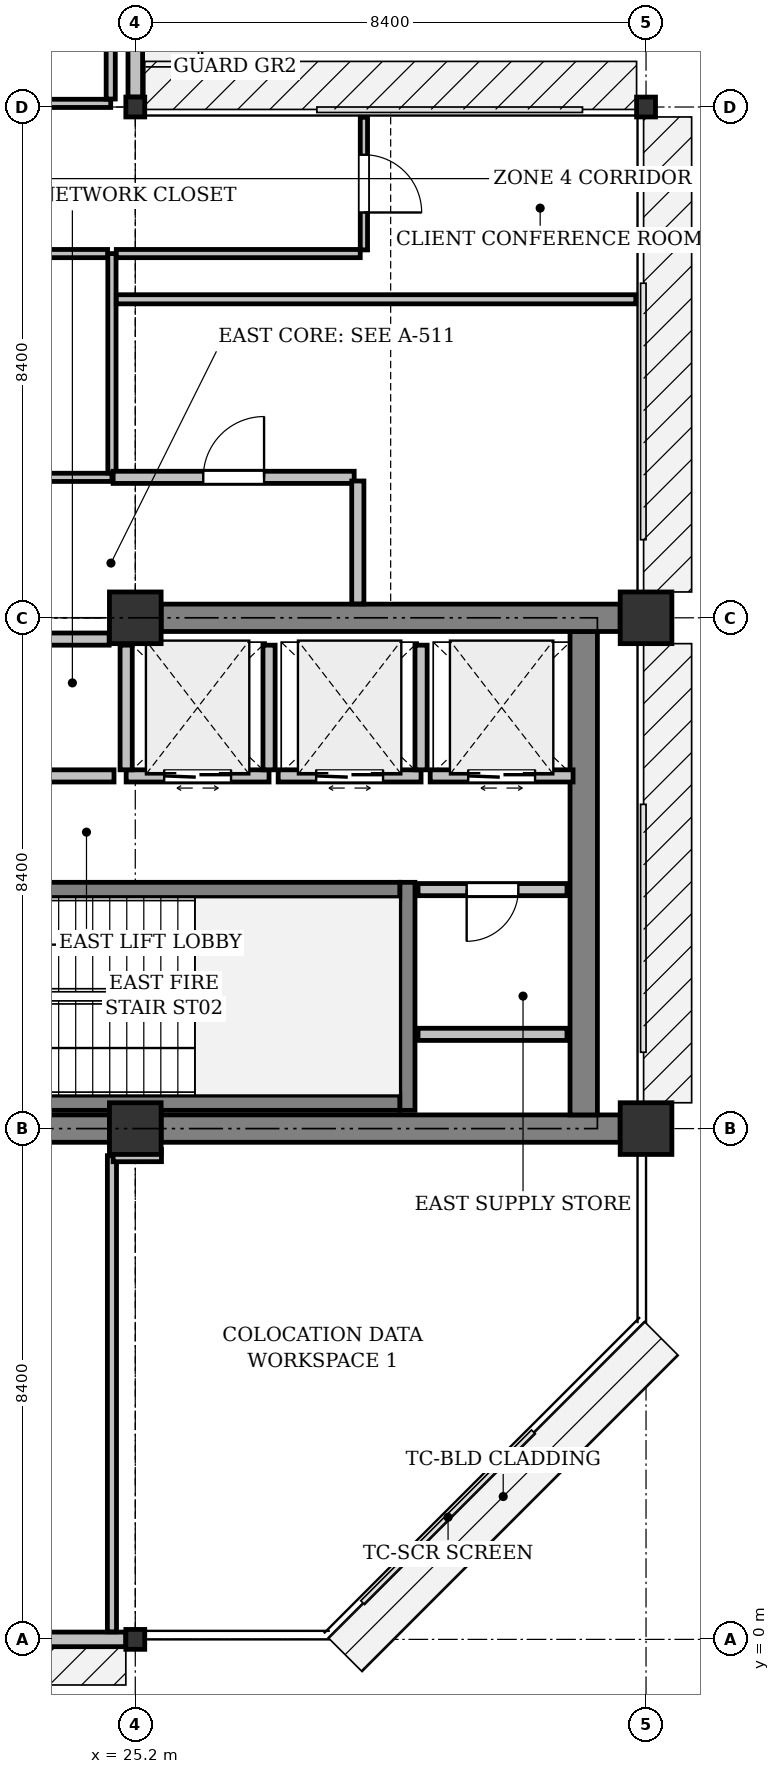
"""IFC4 building model, lengths in metres.
Left out: names, types, materials, properties, quantities, classifications, styles, units other than length and angle.
Written with IfcOpenShell. Run it as: python <this file> out.ifc"""

import sys

from ifc_helpers import new_model, si_unit, direction, frame, frame_2d, origin, origin_2d, place, context, subcontext, project, spatial, rectangle, i_section, extrude, element, fill, save


model = new_model("IFC4")
c1 = context("Model", 3, precision=1e-05, world=origin(), true_north=direction((0.0, 1.0)))
c2 = subcontext(c1, "Body", "Model", "MODEL_VIEW")
j1 = project(units=[si_unit("LENGTHUNIT", "METRE"), si_unit("PLANEANGLEUNIT", "RADIAN")], contexts=[c1])
p1 = place(None, origin())
s1 = spatial("IfcSite", under=j1, at=p1, CompositionType="ELEMENT")
p2 = place(p1, origin())
s2 = spatial("IfcBuilding", under=s1, at=p2, CompositionType="ELEMENT")
p3 = place(p2, frame((0.0, 0.0, 314.2)))
s3 = spatial("IfcBuildingStorey", under=s2, at=p3, CompositionType="ELEMENT", Elevation=314.2)
p4 = place(p3, frame((25.2, 0.0, 0.0), z_axis=(0.0, 0.0, 1.0), x_axis=(1.0, 0.0, 0.0)))
e1 = element("IfcColumn", 1, at=p4, inside=s3, PredefinedType="COLUMN", context=c2, shape_type="SweptSolid", body=[
    extrude(i_section(OverallWidth=0.311, OverallDepth=0.327, WebThickness=0.016, FlangeThickness=0.025, FilletRadius=0.017, at=origin_2d()), origin(), (0.0, 0.0, 1.0), 4.0),
])
for number, where, z_axis, x_axis in (
    (2, (25.2, 8.4, 0.0), (0.0, 0.0, 1.0), (1.0, 0.0, 0.0)),
    (3, (25.2, 16.8, 0.0), (0.0, 0.0, 1.0), (1.0, 0.0, 0.0)),
):
    element("IfcColumn", number, at=place(p3, frame(where, z_axis=z_axis, x_axis=x_axis)), inside=s3, PredefinedType="COLUMN", context=c2, shape_type="SweptSolid", body=[
        extrude(rectangle(XDim=0.85, YDim=0.85, at=origin_2d()), origin(), (0.0, 0.0, 1.0), 4.0),
    ])
p5 = place(p3, frame((25.2, 25.2, 0.0), z_axis=(0.0, 0.0, 1.0), x_axis=(1.0, 0.0, 0.0)))
e4 = element("IfcColumn", 4, at=p5, inside=s3, PredefinedType="COLUMN", context=c2, shape_type="SweptSolid", body=[
    extrude(i_section(OverallWidth=0.311, OverallDepth=0.327, WebThickness=0.016, FlangeThickness=0.025, FilletRadius=0.017, at=origin_2d()), origin(), (0.0, 0.0, 1.0), 4.0),
])
for number, where, z_axis, x_axis in (
    (5, (33.6, 8.4, 0.0), (0.0, 0.0, 1.0), (1.0, 0.0, 0.0)),
    (6, (33.6, 16.8, 0.0), (0.0, 0.0, 1.0), (1.0, 0.0, 0.0)),
):
    element("IfcColumn", number, at=place(p3, frame(where, z_axis=z_axis, x_axis=x_axis)), inside=s3, PredefinedType="COLUMN", context=c2, shape_type="SweptSolid", body=[
        extrude(rectangle(XDim=0.85, YDim=0.85, at=origin_2d()), origin(), (0.0, 0.0, 1.0), 4.0),
    ])
p6 = place(p3, frame((33.6, 25.2, 0.0), z_axis=(0.0, 0.0, 1.0), x_axis=(1.0, 0.0, 0.0)))
e7 = element("IfcColumn", 7, at=p6, inside=s3, PredefinedType="COLUMN", context=c2, shape_type="SweptSolid", body=[
    extrude(i_section(OverallWidth=0.311, OverallDepth=0.327, WebThickness=0.016, FlangeThickness=0.025, FilletRadius=0.017, at=origin_2d()), origin(), (0.0, 0.0, 1.0), 4.0),
])
p7 = place(p3, frame((25.044, 0.0, 0.0), z_axis=(0.0, 0.0, 1.0), x_axis=(-1.0, 0.0, 0.0)))
e8 = element("IfcWall", 8, at=p7, inside=s3, PredefinedType="STANDARD", context=c2, shape_type="SweptSolid", body=[
    extrude(rectangle(XDim=8.089, YDim=0.24, at=frame_2d((4.044, 0.0))), origin(), (0.0, 0.0, 1.0), 3.475),
])
p8 = place(p7, frame((3.364, 0.0, 0.9)))
e9 = element("IfcOpeningElement", 9, at=p8, cuts=e8, PredefinedType="OPENING", context=c2, shape_type="SweptSolid", body=[
    extrude(rectangle(XDim=1.5, YDim=1.6, at=frame_2d((0.75, 0.8))), frame((0.0, 0.13, 0.0), z_axis=(0.0, -1.0, 0.0), x_axis=(1.0, 0.0, 0.0)), (0.0, 0.0, 1.0), 0.26),
])
p9 = place(p3, frame((25.2, 33.437, 0.0), z_axis=(0.0, 0.0, 1.0), x_axis=(0.0, -1.0, 0.0)))
e10 = element("IfcWall", 10, at=p9, inside=s3, PredefinedType="STANDARD", context=c2, shape_type="SweptSolid", body=[
    extrude(rectangle(XDim=8.073, YDim=0.24, at=frame_2d((4.037, 0.0))), origin(), (0.0, 0.0, 1.0), 3.475),
])
p10 = place(p9, frame((0.3, 0.0, 0.0)))
e11 = element("IfcOpeningElement", 11, at=p10, cuts=e10, PredefinedType="OPENING", context=c2, shape_type="SweptSolid", body=[
    extrude(rectangle(XDim=1.2, YDim=2.2, at=frame_2d((0.6, 1.1))), frame((0.0, 0.13, 0.0), z_axis=(0.0, -1.0, 0.0), x_axis=(1.0, 0.0, 0.0)), (0.0, 0.0, 1.0), 0.26),
])
p11 = place(p9, frame((3.287, 0.0, 0.9)))
e12 = element("IfcOpeningElement", 12, at=p11, cuts=e10, PredefinedType="OPENING", context=c2, shape_type="SweptSolid", body=[
    extrude(rectangle(XDim=1.5, YDim=1.6, at=frame_2d((0.75, 0.8))), frame((0.0, 0.13, 0.0), z_axis=(0.0, -1.0, 0.0), x_axis=(1.0, 0.0, 0.0)), (0.0, 0.0, 1.0), 0.26),
])
p12 = place(p3, frame((17.225, 8.4, 0.0), z_axis=(0.0, 0.0, 1.0), x_axis=(1.0, 0.0, 0.0)))
e13 = element("IfcWall", 13, at=p12, inside=s3, PredefinedType="SHEAR", context=c2, shape_type="SweptSolid", body=[
    extrude(rectangle(XDim=7.55, YDim=0.45, at=frame_2d((3.775, 0.0))), origin(), (0.0, 0.0, 1.0), 3.725),
])
p13 = place(p3, frame((25.625, 8.4, 0.0), z_axis=(0.0, 0.0, 1.0), x_axis=(1.0, 0.0, 0.0)))
e14 = element("IfcWall", 14, at=p13, inside=s3, PredefinedType="SHEAR", context=c2, shape_type="SweptSolid", body=[
    extrude(rectangle(XDim=7.55, YDim=0.45, at=frame_2d((3.775, 0.0))), origin(), (0.0, 0.0, 1.0), 3.725),
])
p14 = place(p3, frame((32.575, 8.625, 0.0), z_axis=(0.0, 0.0, 1.0), x_axis=(0.0, 1.0, 0.0)))
e15 = element("IfcWall", 15, at=p14, inside=s3, PredefinedType="SHEAR", context=c2, shape_type="SweptSolid", body=[
    extrude(rectangle(XDim=7.95, YDim=0.45, at=frame_2d((3.975, 0.0))), origin(), (0.0, 0.0, 1.0), 3.725),
])
p15 = place(p3, frame((25.625, 16.8, 0.0), z_axis=(0.0, 0.0, 1.0), x_axis=(1.0, 0.0, 0.0)))
e16 = element("IfcWall", 16, at=p15, inside=s3, PredefinedType="SHEAR", context=c2, shape_type="SweptSolid", body=[
    extrude(rectangle(XDim=7.55, YDim=0.45, at=frame_2d((3.775, 0.0))), origin(), (0.0, 0.0, 1.0), 3.725),
])
p16 = place(p3, frame((29.675, 8.7, 0.0), z_axis=(0.0, 0.0, 1.0), x_axis=(0.0, 1.0, 0.0)))
e17 = element("IfcWall", 17, at=p16, inside=s3, PredefinedType="SHEAR", context=c2, shape_type="SweptSolid", body=[
    extrude(rectangle(XDim=3.75, YDim=0.25, at=frame_2d((1.875, 0.0))), origin(), (0.0, 0.0, 1.0), 3.725),
])
p17 = place(p3, frame((21.8, 8.825, 0.0), z_axis=(0.0, 0.0, 1.0), x_axis=(1.0, 0.0, 0.0)))
e18 = element("IfcWall", 18, at=p17, inside=s3, PredefinedType="SHEAR", context=c2, shape_type="SweptSolid", body=[
    extrude(rectangle(XDim=7.75, YDim=0.25, at=frame_2d((3.875, 0.0))), origin(), (0.0, 0.0, 1.0), 3.725),
])
p18 = place(p3, frame((21.8, 12.325, 0.0), z_axis=(0.0, 0.0, 1.0), x_axis=(1.0, 0.0, 0.0)))
e19 = element("IfcWall", 19, at=p18, inside=s3, PredefinedType="SHEAR", context=c2, shape_type="SweptSolid", body=[
    extrude(rectangle(XDim=7.75, YDim=0.25, at=frame_2d((3.875, 0.0))), origin(), (0.0, 0.0, 1.0), 3.725),
])
p19 = place(p18, frame((0.22, 0.0, 0.0)))
e20 = element("IfcOpeningElement", 20, at=p19, cuts=e19, PredefinedType="OPENING", context=c2, shape_type="SweptSolid", body=[
    extrude(rectangle(XDim=1.1, YDim=2.15, at=frame_2d((0.55, 1.075))), frame((0.0, 0.135, 0.0), z_axis=(0.0, -1.0, 0.0), x_axis=(1.0, 0.0, 0.0)), (0.0, 0.0, 1.0), 0.27),
])
p20 = place(p3, frame((25.05, 14.2, 0.0), z_axis=(0.0, 0.0, 1.0), x_axis=(1.0, 0.0, 0.0)))
e21 = element("IfcWall", 21, at=p20, inside=s3, PredefinedType="PARTITIONING", context=c2, shape_type="SweptSolid", body=[
    extrude(rectangle(XDim=2.35, YDim=0.2, at=frame_2d((1.175, 0.0))), origin(), (0.0, 0.0, 1.0), 3.725),
])
p21 = place(p20, frame((0.625, 0.0, 0.0)))
e22 = element("IfcOpeningElement", 22, at=p21, cuts=e21, PredefinedType="OPENING", context=c2, shape_type="SweptSolid", body=[
    extrude(rectangle(XDim=1.1, YDim=2.2, at=frame_2d((0.55, 1.1))), frame((0.0, 0.11, 0.0), z_axis=(0.0, -1.0, 0.0), x_axis=(1.0, 0.0, 0.0)), (0.0, 0.0, 1.0), 0.22),
])
for number, where, z_axis, x_axis in (
    (23, (27.4, 14.3, 0.0), (0.0, 0.0, 1.0), (0.0, 1.0, 0.0)),
    (24, (25.05, 14.3, 0.0), (0.0, 0.0, 1.0), (0.0, 1.0, 0.0)),
):
    element("IfcWall", number, at=place(p3, frame(where, z_axis=z_axis, x_axis=x_axis)), inside=s3, PredefinedType="PARTITIONING", context=c2, shape_type="SweptSolid", body=[
        extrude(rectangle(XDim=2.05, YDim=0.2, at=frame_2d((1.025, 0.0))), origin(), (0.0, 0.0, 1.0), 3.725),
    ])
p22 = place(p3, frame((27.55, 14.2, 0.0), z_axis=(0.0, 0.0, 1.0), x_axis=(1.0, 0.0, 0.0)))
e25 = element("IfcWall", 25, at=p22, inside=s3, PredefinedType="PARTITIONING", context=c2, shape_type="SweptSolid", body=[
    extrude(rectangle(XDim=2.35, YDim=0.2, at=frame_2d((1.175, 0.0))), origin(), (0.0, 0.0, 1.0), 3.725),
])
p23 = place(p22, frame((0.625, 0.0, 0.0)))
e26 = element("IfcOpeningElement", 26, at=p23, cuts=e25, PredefinedType="OPENING", context=c2, shape_type="SweptSolid", body=[
    extrude(rectangle(XDim=1.1, YDim=2.2, at=frame_2d((0.55, 1.1))), frame((0.0, 0.11, 0.0), z_axis=(0.0, -1.0, 0.0), x_axis=(1.0, 0.0, 0.0)), (0.0, 0.0, 1.0), 0.22),
])
p24 = place(p3, frame((29.9, 14.3, 0.0), z_axis=(0.0, 0.0, 1.0), x_axis=(0.0, 1.0, 0.0)))
e27 = element("IfcWall", 27, at=p24, inside=s3, PredefinedType="PARTITIONING", context=c2, shape_type="SweptSolid", body=[
    extrude(rectangle(XDim=2.05, YDim=0.2, at=frame_2d((1.025, 0.0))), origin(), (0.0, 0.0, 1.0), 3.725),
])
p25 = place(p3, frame((30.05, 14.2, 0.0), z_axis=(0.0, 0.0, 1.0), x_axis=(1.0, 0.0, 0.0)))
e28 = element("IfcWall", 28, at=p25, inside=s3, PredefinedType="PARTITIONING", context=c2, shape_type="SweptSolid", body=[
    extrude(rectangle(XDim=2.35, YDim=0.2, at=frame_2d((1.175, 0.0))), origin(), (0.0, 0.0, 1.0), 3.725),
])
p26 = place(p25, frame((0.625, 0.0, 0.0)))
e29 = element("IfcOpeningElement", 29, at=p26, cuts=e28, PredefinedType="OPENING", context=c2, shape_type="SweptSolid", body=[
    extrude(rectangle(XDim=1.1, YDim=2.2, at=frame_2d((0.55, 1.1))), frame((0.0, 0.11, 0.0), z_axis=(0.0, -1.0, 0.0), x_axis=(1.0, 0.0, 0.0)), (0.0, 0.0, 1.0), 0.22),
])
p27 = place(p3, frame((24.77, 16.45, 0.0), z_axis=(0.0, 0.0, 1.0), x_axis=(-1.0, 0.0, 0.0)))
e30 = element("IfcWall", 30, at=p27, inside=s3, PredefinedType="PARTITIONING", context=c2, shape_type="SweptSolid", body=[
    extrude(rectangle(XDim=3.07, YDim=0.2, at=frame_2d((1.535, 0.0))), origin(), (0.0, 0.0, 1.0), 3.725),
])
p28 = place(p3, frame((21.7, 14.2, 0.0), z_axis=(0.0, 0.0, 1.0), x_axis=(1.0, 0.0, 0.0)))
e31 = element("IfcWall", 31, at=p28, inside=s3, PredefinedType="PARTITIONING", context=c2, shape_type="SweptSolid", body=[
    extrude(rectangle(XDim=3.15, YDim=0.2, at=frame_2d((1.575, 0.0))), origin(), (0.0, 0.0, 1.0), 3.725),
])
p29 = place(p28, frame((1.15, 0.0, 0.0)))
e32 = element("IfcOpeningElement", 32, at=p29, cuts=e31, PredefinedType="OPENING", context=c2, shape_type="SweptSolid", body=[
    extrude(rectangle(XDim=0.85, YDim=2.15, at=frame_2d((0.425, 1.075))), frame((0.0, 0.11, 0.0), z_axis=(0.0, -1.0, 0.0), x_axis=(1.0, 0.0, 0.0)), (0.0, 0.0, 1.0), 0.22),
])
p30 = place(p3, frame((32.3, 12.33, 0.0), z_axis=(0.0, 0.0, 1.0), x_axis=(-1.0, 0.0, 0.0)))
e33 = element("IfcWall", 33, at=p30, inside=s3, PredefinedType="PARTITIONING", context=c2, shape_type="SweptSolid", body=[
    extrude(rectangle(XDim=2.45, YDim=0.2, at=frame_2d((1.225, 0.0))), origin(), (0.0, 0.0, 1.0), 3.725),
])
p31 = place(p30, frame((0.8, 0.0, 0.0)))
e34 = element("IfcOpeningElement", 34, at=p31, cuts=e33, PredefinedType="OPENING", context=c2, shape_type="SweptSolid", body=[
    extrude(rectangle(XDim=0.85, YDim=2.15, at=frame_2d((0.425, 1.075))), frame((0.0, 0.11, 0.0), z_axis=(0.0, -1.0, 0.0), x_axis=(1.0, 0.0, 0.0)), (0.0, 0.0, 1.0), 0.22),
])
p32 = place(p3, frame((29.85, 9.95, 0.0), z_axis=(0.0, 0.0, 1.0), x_axis=(1.0, 0.0, 0.0)))
e35 = element("IfcWall", 35, at=p32, inside=s3, PredefinedType="PARTITIONING", context=c2, shape_type="SweptSolid", body=[
    extrude(rectangle(XDim=2.45, YDim=0.2, at=frame_2d((1.225, 0.0))), origin(), (0.0, 0.0, 1.0), 3.725),
])
p33 = place(p3, frame((20.031, 19.11, 0.0), z_axis=(0.0, 0.0, 1.0), x_axis=(1.0, 0.0, 0.0)))
e36 = element("IfcWall", 36, at=p33, inside=s3, PredefinedType="PARTITIONING", context=c2, shape_type="SweptSolid", body=[
    extrude(rectangle(XDim=4.784, YDim=0.135, at=frame_2d((2.392, 0.0))), origin(), (0.0, 0.0, 1.0), 3.421),
])
p34 = place(p33, frame((1.917, 0.0, 0.0)))
e37 = element("IfcOpeningElement", 37, at=p34, cuts=e36, PredefinedType="OPENING", context=c2, shape_type="SweptSolid", body=[
    extrude(rectangle(XDim=0.95, YDim=2.15, at=frame_2d((0.475, 1.075))), frame((0.0, 0.077, 0.0), z_axis=(0.0, -1.0, 0.0), x_axis=(1.0, 0.0, 0.0)), (0.0, 0.0, 1.0), 0.155),
])
p35 = place(p3, frame((24.816, 19.181, 0.0), z_axis=(0.0, 0.0, 1.0), x_axis=(0.0, 1.0, 0.0)))
e38 = element("IfcWall", 38, at=p35, inside=s3, PredefinedType="PARTITIONING", context=c2, shape_type="SweptSolid", body=[
    extrude(rectangle(XDim=3.609, YDim=0.135, at=frame_2d((1.804, 0.0))), origin(), (0.0, 0.0, 1.0), 3.725),
])
p36 = place(p3, frame((24.744, 22.79, 0.0), z_axis=(0.0, 0.0, 1.0), x_axis=(-1.0, 0.0, 0.0)))
e39 = element("IfcWall", 39, at=p36, inside=s3, PredefinedType="PARTITIONING", context=c2, shape_type="SweptSolid", body=[
    extrude(rectangle(XDim=4.713, YDim=0.135, at=frame_2d((2.356, 0.0))), origin(), (0.0, 0.0, 1.0), 3.421),
])
p37 = place(p3, frame((20.039, 25.26, 0.0), z_axis=(0.0, 0.0, 1.0), x_axis=(1.0, 0.0, 0.0)))
e40 = element("IfcWall", 40, at=p37, inside=s3, PredefinedType="PARTITIONING", context=c2, shape_type="SweptSolid", body=[
    extrude(rectangle(XDim=4.777, YDim=0.135, at=frame_2d((2.388, 0.0))), origin(), (0.0, 0.0, 1.0), 3.271),
])
p38 = place(p3, frame((24.816, 25.332, 0.0), z_axis=(0.0, 0.0, 1.0), x_axis=(0.0, 1.0, 0.0)))
e41 = element("IfcWall", 41, at=p38, inside=s3, PredefinedType="PARTITIONING", context=c2, shape_type="SweptSolid", body=[
    extrude(rectangle(XDim=6.605, YDim=0.15, at=frame_2d((3.302, 0.0))), origin(), (0.0, 0.0, 1.0), 3.725),
])
p39 = place(p3, frame((24.816, 0.124, 0.0), z_axis=(0.0, 0.0, 1.0), x_axis=(0.0, 1.0, 0.0)))
e42 = element("IfcWall", 42, at=p39, inside=s3, PredefinedType="PARTITIONING", context=c2, shape_type="SweptSolid", body=[
    extrude(rectangle(XDim=7.831, YDim=0.15, at=frame_2d((3.916, 0.0))), origin(), (0.0, 0.0, 1.0), 3.725),
])
p40 = place(p3, frame((25.631, 7.956, 0.0), z_axis=(0.0, 0.0, 1.0), x_axis=(-0.999999575533, -0.00092137553, 0.0)))
e43 = element("IfcWall", 43, at=p40, inside=s3, PredefinedType="PARTITIONING", context=c2, shape_type="SweptSolid", body=[
    extrude(rectangle(XDim=0.795, YDim=0.2, at=frame_2d((0.397, 0.0))), origin(), (0.0, 0.0, 1.0), 3.319),
])
p41 = place(p3, frame((28.96, 25.031, 0.0), z_axis=(0.0, 0.0, 1.0), x_axis=(0.0, -1.0, 0.0)))
e44 = element("IfcWall", 44, at=p41, inside=s3, PredefinedType="PARTITIONING", context=c2, shape_type="SweptSolid", body=[
    extrude(rectangle(XDim=2.181, YDim=0.2, at=frame_2d((1.09, 0.0))), origin(), (0.0, 0.0, 1.0), 3.725),
])
p42 = place(p3, frame((28.9, 22.79, 0.0), z_axis=(0.0, 0.0, 1.0), x_axis=(-1.0, 0.0, 0.0)))
e45 = element("IfcWall", 45, at=p42, inside=s3, PredefinedType="PARTITIONING", context=c2, shape_type="SweptSolid", body=[
    extrude(rectangle(XDim=4.012, YDim=0.2, at=frame_2d((2.006, 0.0))), origin(), (0.0, 0.0, 1.0), 3.319),
])
p43 = place(p42, frame((1.506, 0.0, 0.0)))
e46 = element("IfcOpeningElement", 46, at=p43, cuts=e45, PredefinedType="OPENING", context=c2, shape_type="SweptSolid", body=[
    extrude(rectangle(XDim=1.0, YDim=2.15, at=frame_2d((0.5, 1.075))), frame((0.0, 0.11, 0.0), z_axis=(0.0, -1.0, 0.0), x_axis=(1.0, 0.0, 0.0)), (0.0, 0.0, 1.0), 0.22),
])
p44 = place(p3, frame((24.836, 19.11, 0.0), z_axis=(0.0, 0.0, 1.0), x_axis=(1.0, 0.0, 0.0)))
e47 = element("IfcWall", 47, at=p44, inside=s3, PredefinedType="PARTITIONING", context=c2, shape_type="SweptSolid", body=[
    extrude(rectangle(XDim=3.964, YDim=0.2, at=frame_2d((1.982, 0.0))), origin(), (0.0, 0.0, 1.0), 3.319),
])
p45 = place(p3, frame((28.86, 19.05, 0.0), z_axis=(0.0, 0.0, 1.0), x_axis=(0.0, -1.0, 0.0)))
e48 = element("IfcWall", 48, at=p45, inside=s3, PredefinedType="PARTITIONING", context=c2, shape_type="SweptSolid", body=[
    extrude(rectangle(XDim=2.021, YDim=0.2, at=frame_2d((1.01, 0.0))), origin(), (0.0, 0.0, 1.0), 3.725),
])
p46 = place(p21, origin())
e49 = element("IfcDoor", 49, at=p46, inside=s3, OperationType="DOUBLE_DOOR_SLIDING", PredefinedType="DOOR", context=c2, shape_type="SweptSolid", body=[
    extrude(rectangle(XDim=1.1, YDim=2.2, at=frame_2d((0.55, 1.1))), frame((0.0, 0.025, 0.0), z_axis=(0.0, -1.0, 0.0), x_axis=(1.0, 0.0, 0.0)), (0.0, 0.0, 1.0), 0.05),
])
fill(e22, e49)
p47 = place(p23, origin())
e50 = element("IfcDoor", 50, at=p47, inside=s3, OperationType="DOUBLE_DOOR_SLIDING", PredefinedType="DOOR", context=c2, shape_type="SweptSolid", body=[
    extrude(rectangle(XDim=1.1, YDim=2.2, at=frame_2d((0.55, 1.1))), frame((0.0, 0.025, 0.0), z_axis=(0.0, -1.0, 0.0), x_axis=(1.0, 0.0, 0.0)), (0.0, 0.0, 1.0), 0.05),
])
fill(e26, e50)
p48 = place(p26, origin())
e51 = element("IfcDoor", 51, at=p48, inside=s3, OperationType="DOUBLE_DOOR_SLIDING", PredefinedType="DOOR", context=c2, shape_type="SweptSolid", body=[
    extrude(rectangle(XDim=1.1, YDim=2.2, at=frame_2d((0.55, 1.1))), frame((0.0, 0.025, 0.0), z_axis=(0.0, -1.0, 0.0), x_axis=(1.0, 0.0, 0.0)), (0.0, 0.0, 1.0), 0.05),
])
fill(e29, e51)
p49 = place(p31, origin())
e52 = element("IfcDoor", 52, at=p49, inside=s3, OperationType="SINGLE_SWING_RIGHT", PredefinedType="DOOR", context=c2, shape_type="SweptSolid", body=[
    extrude(rectangle(XDim=0.85, YDim=2.15, at=frame_2d((0.425, 1.075))), frame((0.0, 0.025, 0.0), z_axis=(0.0, -1.0, 0.0), x_axis=(1.0, 0.0, 0.0)), (0.0, 0.0, 1.0), 0.05),
])
fill(e34, e52)
p50 = place(p43, origin())
e53 = element("IfcDoor", 53, at=p50, inside=s3, OperationType="SINGLE_SWING_RIGHT", PredefinedType="DOOR", context=c2, shape_type="SweptSolid", body=[
    extrude(rectangle(XDim=1.0, YDim=2.15, at=frame_2d((0.5, 1.075))), frame((0.0, 0.025, 0.0), z_axis=(0.0, -1.0, 0.0), x_axis=(1.0, 0.0, 0.0)), (0.0, 0.0, 1.0), 0.05),
])
fill(e46, e53)
save(model, sys.argv[1])
